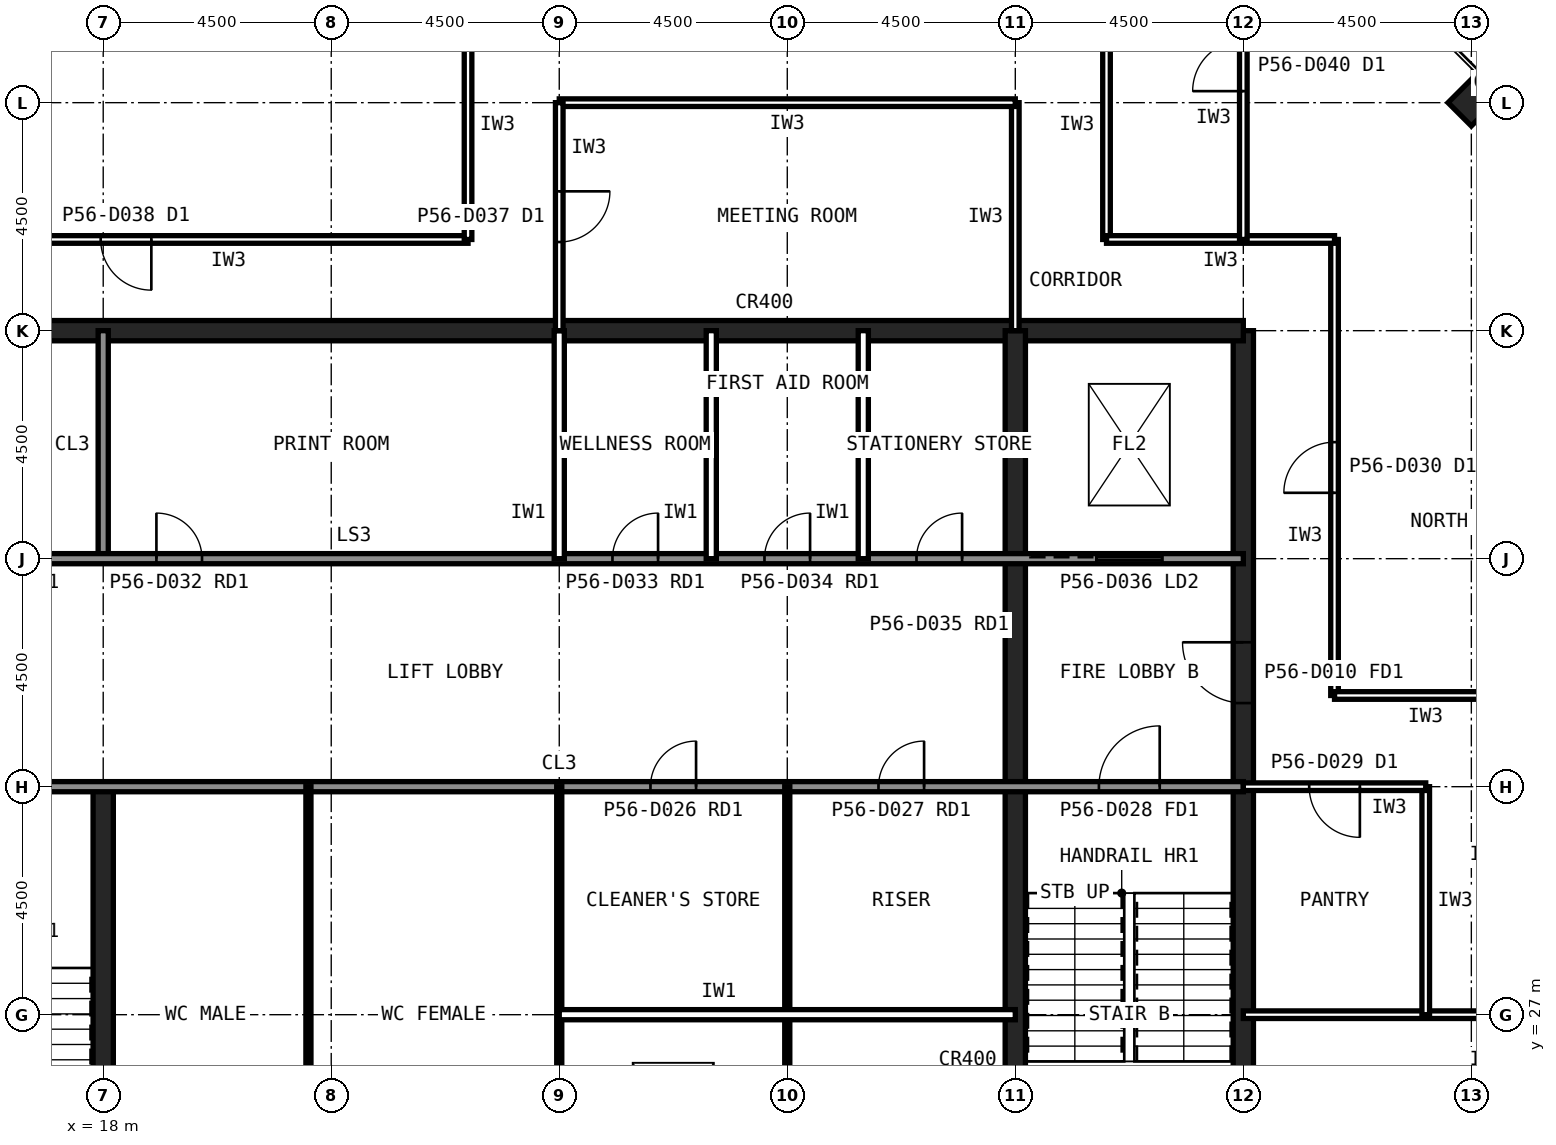
"""IFC4 building model, lengths in metres.
Left out: names, types, materials, properties, quantities, classifications, styles, units other than length and angle.
Written with IfcOpenShell. Run it as: python <this file> out.ifc"""

import sys

from ifc_helpers import new_model, si_unit, direction, frame, frame_2d, origin, origin_2d, place, context, subcontext, project, spatial, rectangle, hollow_rectangle, extrude, element, fill, save


model = new_model("IFC4")
c1 = context("Model", 3, precision=1e-05, world=origin(), true_north=direction((0.0, 1.0)))
c2 = subcontext(c1, "Body", "Model", "MODEL_VIEW")
j1 = project(units=[si_unit("LENGTHUNIT", "METRE"), si_unit("PLANEANGLEUNIT", "RADIAN")], contexts=[c1])
p1 = place(None, origin())
s1 = spatial("IfcSite", under=j1, at=p1, CompositionType="ELEMENT")
p2 = place(p1, origin())
s2 = spatial("IfcBuilding", under=s1, at=p2, CompositionType="ELEMENT")
p3 = place(p2, frame((0.0, 0.0, 238.6)))
s3 = spatial("IfcBuildingStorey", under=s2, at=p3, CompositionType="ELEMENT", Elevation=238.6)
p4 = place(p3, frame((45.0, 45.0, 0.0), z_axis=(0.0, 0.0, 1.0), x_axis=(0.707106781187, 0.707106781187, 0.0)))
e1 = element("IfcColumn", 1, at=p4, inside=s3, PredefinedType="COLUMN", context=c2, shape_type="SweptSolid", body=[
    extrude(hollow_rectangle(XDim=0.65, YDim=0.65, WallThickness=0.032, at=origin_2d()), origin(), (0.0, 0.0, 1.0), 4.0),
])
p5 = place(p3, frame((40.5, 13.5, 0.0), z_axis=(0.0, 0.0, 1.0), x_axis=(0.0, 1.0, 0.0)))
e2 = element("IfcWall", 2, at=p5, inside=s3, PredefinedType="SHEAR", context=c2, shape_type="SweptSolid", body=[
    extrude(rectangle(XDim=27.0, YDim=0.4, at=frame_2d((13.5, 0.0))), origin(), (0.0, 0.0, 1.0), 4.0),
])
p6 = place(p5, frame((5.85, 0.0, 0.0)))
e3 = element("IfcOpeningElement", 3, at=p6, cuts=e2, PredefinedType="OPENING", context=c2, shape_type="SweptSolid", body=[
    extrude(rectangle(XDim=1.8, YDim=2.1, at=frame_2d((0.9, 1.05))), frame((0.0, 0.21, 0.0), z_axis=(0.0, -1.0, 0.0), x_axis=(1.0, 0.0, 0.0)), (0.0, 0.0, 1.0), 0.42),
])
p7 = place(p5, frame((19.65, 0.0, 0.0)))
e4 = element("IfcOpeningElement", 4, at=p7, cuts=e2, PredefinedType="OPENING", context=c2, shape_type="SweptSolid", body=[
    extrude(rectangle(XDim=1.2, YDim=2.1, at=frame_2d((0.6, 1.05))), frame((0.0, 0.21, 0.0), z_axis=(0.0, -1.0, 0.0), x_axis=(1.0, 0.0, 0.0)), (0.0, 0.0, 1.0), 0.42),
])
p8 = place(p3, frame((40.5, 40.5, 0.0), z_axis=(0.0, 0.0, 1.0), x_axis=(-1.0, 0.0, 0.0)))
e5 = element("IfcWall", 5, at=p8, inside=s3, PredefinedType="SHEAR", context=c2, shape_type="SweptSolid", body=[
    extrude(rectangle(XDim=27.0, YDim=0.4, at=frame_2d((13.5, 0.0))), origin(), (0.0, 0.0, 1.0), 4.0),
])
p9 = place(p3, frame((18.0, 13.5, 0.0), z_axis=(0.0, 0.0, 1.0), x_axis=(0.0, 1.0, 0.0)))
e6 = element("IfcWall", 6, at=p9, inside=s3, PredefinedType="SHEAR", context=c2, shape_type="SweptSolid", body=[
    extrude(rectangle(XDim=18.0, YDim=0.4, at=frame_2d((9.0, 0.0))), origin(), (0.0, 0.0, 1.0), 4.0),
])
p10 = place(p3, frame((18.0, 36.0, 0.0), z_axis=(0.0, 0.0, 1.0), x_axis=(0.0, 1.0, 0.0)))
e7 = element("IfcWall", 7, at=p10, inside=s3, PredefinedType="SOLIDWALL", context=c2, shape_type="SweptSolid", body=[
    extrude(rectangle(XDim=4.5, YDim=0.2, at=frame_2d((2.25, 0.0))), origin(), (0.0, 0.0, 1.0), 3.84),
])
p11 = place(p3, frame((36.0, 22.5, 0.0), z_axis=(0.0, 0.0, 1.0), x_axis=(0.0, 1.0, 0.0)))
e8 = element("IfcWall", 8, at=p11, inside=s3, PredefinedType="SHEAR", context=c2, shape_type="SweptSolid", body=[
    extrude(rectangle(XDim=18.0, YDim=0.4, at=frame_2d((9.0, 0.0))), origin(), (0.0, 0.0, 1.0), 4.0),
])
p12 = place(p3, frame((13.5, 36.0, 0.0), z_axis=(0.0, 0.0, 1.0), x_axis=(1.0, 0.0, 0.0)))
e9 = element("IfcWall", 9, at=p12, inside=s3, PredefinedType="SOLIDWALL", context=c2, shape_type="SweptSolid", body=[
    extrude(rectangle(XDim=27.0, YDim=0.2, at=frame_2d((13.5, 0.0))), origin(), (0.0, 0.0, 1.0), 3.84),
])
p13 = place(p12, frame((1.8, 0.0, 0.0)))
e10 = element("IfcOpeningElement", 10, at=p13, cuts=e9, PredefinedType="OPENING", context=c2, shape_type="SweptSolid", body=[
    extrude(rectangle(XDim=0.9, YDim=2.1, at=frame_2d((0.45, 1.05))), frame((0.0, 0.11, 0.0), z_axis=(0.0, -1.0, 0.0), x_axis=(1.0, 0.0, 0.0)), (0.0, 0.0, 1.0), 0.22),
])
p14 = place(p12, frame((5.55, 0.0, 0.0)))
e11 = element("IfcOpeningElement", 11, at=p14, cuts=e9, PredefinedType="OPENING", context=c2, shape_type="SweptSolid", body=[
    extrude(rectangle(XDim=0.9, YDim=2.1, at=frame_2d((0.45, 1.05))), frame((0.0, 0.11, 0.0), z_axis=(0.0, -1.0, 0.0), x_axis=(1.0, 0.0, 0.0)), (0.0, 0.0, 1.0), 0.22),
])
p15 = place(p12, frame((14.55, 0.0, 0.0)))
e12 = element("IfcOpeningElement", 12, at=p15, cuts=e9, PredefinedType="OPENING", context=c2, shape_type="SweptSolid", body=[
    extrude(rectangle(XDim=0.9, YDim=2.1, at=frame_2d((0.45, 1.05))), frame((0.0, 0.11, 0.0), z_axis=(0.0, -1.0, 0.0), x_axis=(1.0, 0.0, 0.0)), (0.0, 0.0, 1.0), 0.22),
])
p16 = place(p12, frame((17.55, 0.0, 0.0)))
e13 = element("IfcOpeningElement", 13, at=p16, cuts=e9, PredefinedType="OPENING", context=c2, shape_type="SweptSolid", body=[
    extrude(rectangle(XDim=0.9, YDim=2.1, at=frame_2d((0.45, 1.05))), frame((0.0, 0.11, 0.0), z_axis=(0.0, -1.0, 0.0), x_axis=(1.0, 0.0, 0.0)), (0.0, 0.0, 1.0), 0.22),
])
p17 = place(p12, frame((20.55, 0.0, 0.0)))
e14 = element("IfcOpeningElement", 14, at=p17, cuts=e9, PredefinedType="OPENING", context=c2, shape_type="SweptSolid", body=[
    extrude(rectangle(XDim=0.9, YDim=2.1, at=frame_2d((0.45, 1.05))), frame((0.0, 0.11, 0.0), z_axis=(0.0, -1.0, 0.0), x_axis=(1.0, 0.0, 0.0)), (0.0, 0.0, 1.0), 0.22),
])
p18 = place(p12, frame((24.1, 0.0, 0.0)))
e15 = element("IfcOpeningElement", 15, at=p18, cuts=e9, PredefinedType="OPENING", context=c2, shape_type="SweptSolid", body=[
    extrude(rectangle(XDim=1.3, YDim=2.2, at=frame_2d((0.65, 1.1))), frame((0.0, 0.11, 0.0), z_axis=(0.0, -1.0, 0.0), x_axis=(1.0, 0.0, 0.0)), (0.0, 0.0, 1.0), 0.22),
])
p19 = place(p3, frame((13.5, 31.5, 0.0), z_axis=(0.0, 0.0, 1.0), x_axis=(1.0, 0.0, 0.0)))
e16 = element("IfcWall", 16, at=p19, inside=s3, PredefinedType="SOLIDWALL", context=c2, shape_type="SweptSolid", body=[
    extrude(rectangle(XDim=27.0, YDim=0.2, at=frame_2d((13.5, 0.0))), origin(), (0.0, 0.0, 1.0), 3.84),
])
p20 = place(p19, frame((24.15, 0.0, 0.0)))
e17 = element("IfcOpeningElement", 17, at=p20, cuts=e16, PredefinedType="OPENING", context=c2, shape_type="SweptSolid", body=[
    extrude(rectangle(XDim=1.2, YDim=2.1, at=frame_2d((0.6, 1.05))), frame((0.0, 0.11, 0.0), z_axis=(0.0, -1.0, 0.0), x_axis=(1.0, 0.0, 0.0)), (0.0, 0.0, 1.0), 0.22),
])
p21 = place(p19, frame((15.3, 0.0, 0.0)))
e18 = element("IfcOpeningElement", 18, at=p21, cuts=e16, PredefinedType="OPENING", context=c2, shape_type="SweptSolid", body=[
    extrude(rectangle(XDim=0.9, YDim=2.1, at=frame_2d((0.45, 1.05))), frame((0.0, 0.11, 0.0), z_axis=(0.0, -1.0, 0.0), x_axis=(1.0, 0.0, 0.0)), (0.0, 0.0, 1.0), 0.22),
])
p22 = place(p19, frame((19.8, 0.0, 0.0)))
e19 = element("IfcOpeningElement", 19, at=p22, cuts=e16, PredefinedType="OPENING", context=c2, shape_type="SweptSolid", body=[
    extrude(rectangle(XDim=0.9, YDim=2.1, at=frame_2d((0.45, 1.05))), frame((0.0, 0.11, 0.0), z_axis=(0.0, -1.0, 0.0), x_axis=(1.0, 0.0, 0.0)), (0.0, 0.0, 1.0), 0.22),
])
for number, where, z_axis, x_axis in (
    (20, (27.0, 36.0, 0.0), (0.0, 0.0, 1.0), (0.0, 1.0, 0.0)),
    (21, (30.0, 36.0, 0.0), (0.0, 0.0, 1.0), (0.0, 1.0, 0.0)),
    (22, (33.0, 36.0, 0.0), (0.0, 0.0, 1.0), (0.0, 1.0, 0.0)),
):
    element("IfcWall", number, at=place(p3, frame(where, z_axis=z_axis, x_axis=x_axis)), inside=s3, PredefinedType="PARTITIONING", context=c2, shape_type="SweptSolid", body=[
        extrude(rectangle(XDim=4.5, YDim=0.2, at=frame_2d((2.25, 0.0))), origin(), (0.0, 0.0, 1.0), 3.84),
    ])
for number, where, z_axis, x_axis in (
    (23, (22.05, 22.5, 0.0), (0.0, 0.0, 1.0), (0.0, 1.0, 0.0)),
    (24, (27.0, 22.5, 0.0), (0.0, 0.0, 1.0), (0.0, 1.0, 0.0)),
    (25, (31.5, 22.5, 0.0), (0.0, 0.0, 1.0), (0.0, 1.0, 0.0)),
):
    element("IfcWall", number, at=place(p3, frame(where, z_axis=z_axis, x_axis=x_axis)), inside=s3, PredefinedType="PLUMBINGWALL", context=c2, shape_type="SweptSolid", body=[
        extrude(rectangle(XDim=9.0, YDim=0.1, at=frame_2d((4.5, 0.0))), origin(), (0.0, 0.0, 1.0), 3.84),
    ])
p23 = place(p3, frame((27.0, 27.0, 0.0), z_axis=(0.0, 0.0, 1.0), x_axis=(1.0, 0.0, 0.0)))
e26 = element("IfcWall", 26, at=p23, inside=s3, PredefinedType="PARTITIONING", context=c2, shape_type="SweptSolid", body=[
    extrude(rectangle(XDim=9.0, YDim=0.2, at=frame_2d((4.5, 0.0))), origin(), (0.0, 0.0, 1.0), 3.84),
])
p24 = place(p3, frame((40.5, 27.0, 0.0), z_axis=(0.0, 0.0, 1.0), x_axis=(1.0, 0.0, 0.0)))
e27 = element("IfcWall", 27, at=p24, inside=s3, PredefinedType="PARTITIONING", context=c2, shape_type="SweptSolid", body=[
    extrude(rectangle(XDim=13.165, YDim=0.15, at=frame_2d((6.583, 0.0))), origin(), (0.0, 0.0, 1.0), 2.989),
])
p25 = place(p3, frame((25.2, 42.3, 0.0), z_axis=(0.0, 0.0, 1.0), x_axis=(-1.0, 0.0, 0.0)))
e28 = element("IfcWall", 28, at=p25, inside=s3, PredefinedType="PARTITIONING", context=c2, shape_type="SweptSolid", body=[
    extrude(rectangle(XDim=13.5, YDim=0.15, at=frame_2d((6.75, 0.0))), origin(), (0.0, 0.0, 1.0), 3.84),
])
p26 = place(p25, frame((6.25, 0.0, 0.0)))
e29 = element("IfcOpeningElement", 29, at=p26, cuts=e28, PredefinedType="OPENING", context=c2, shape_type="SweptSolid", body=[
    extrude(rectangle(XDim=1.0, YDim=2.1, at=frame_2d((0.5, 1.05))), frame((0.0, 0.085, 0.0), z_axis=(0.0, -1.0, 0.0), x_axis=(1.0, 0.0, 0.0)), (0.0, 0.0, 1.0), 0.17),
])
p27 = place(p3, frame((42.3, 33.3, 0.0), z_axis=(0.0, 0.0, 1.0), x_axis=(0.0, 1.0, 0.0)))
e30 = element("IfcWall", 30, at=p27, inside=s3, PredefinedType="PARTITIONING", context=c2, shape_type="SweptSolid", body=[
    extrude(rectangle(XDim=9.0, YDim=0.15, at=frame_2d((4.5, 0.0))), origin(), (0.0, 0.0, 1.0), 3.84),
])
p28 = place(p27, frame((4.0, 0.0, 0.0)))
e31 = element("IfcOpeningElement", 31, at=p28, cuts=e30, PredefinedType="OPENING", context=c2, shape_type="SweptSolid", body=[
    extrude(rectangle(XDim=1.0, YDim=2.1, at=frame_2d((0.5, 1.05))), frame((0.0, 0.085, 0.0), z_axis=(0.0, -1.0, 0.0), x_axis=(1.0, 0.0, 0.0)), (0.0, 0.0, 1.0), 0.17),
])
for number, where, z_axis, x_axis in (
    (32, (25.2, 46.8, 0.0), (0.0, 0.0, 1.0), (0.0, -1.0, 0.0)),
    (33, (37.8, 42.3, 0.0), (0.0, 0.0, 1.0), (0.0, 1.0, 0.0)),
    (34, (42.3, 42.3, 0.0), (0.0, 0.0, 1.0), (-1.0, 0.0, 0.0)),
):
    element("IfcWall", number, at=place(p3, frame(where, z_axis=z_axis, x_axis=x_axis)), inside=s3, PredefinedType="PARTITIONING", context=c2, shape_type="SweptSolid", body=[
        extrude(rectangle(XDim=4.5, YDim=0.15, at=frame_2d((2.25, 0.0))), origin(), (0.0, 0.0, 1.0), 3.84),
    ])
p29 = place(p3, frame((45.9, 33.3, 0.0), z_axis=(0.0, 0.0, 1.0), x_axis=(-1.0, 0.0, 0.0)))
e35 = element("IfcWall", 35, at=p29, inside=s3, PredefinedType="PARTITIONING", context=c2, shape_type="SweptSolid", body=[
    extrude(rectangle(XDim=3.6, YDim=0.15, at=frame_2d((1.8, 0.0))), origin(), (0.0, 0.0, 1.0), 3.84),
])
p30 = place(p3, frame((36.0, 40.5, 0.0), z_axis=(0.0, 0.0, 1.0), x_axis=(0.0, 1.0, 0.0)))
e36 = element("IfcWall", 36, at=p30, inside=s3, PredefinedType="PARTITIONING", context=c2, shape_type="SweptSolid", body=[
    extrude(rectangle(XDim=4.5, YDim=0.15, at=frame_2d((2.25, 0.0))), origin(), (0.0, 0.0, 1.0), 2.989),
])
p31 = place(p3, frame((36.0, 45.0, 0.0), z_axis=(0.0, 0.0, 1.0), x_axis=(-1.0, 0.0, 0.0)))
e37 = element("IfcWall", 37, at=p31, inside=s3, PredefinedType="PARTITIONING", context=c2, shape_type="SweptSolid", body=[
    extrude(rectangle(XDim=9.0, YDim=0.15, at=frame_2d((4.5, 0.0))), origin(), (0.0, 0.0, 1.0), 3.84),
])
p32 = place(p3, frame((27.0, 45.0, 0.0), z_axis=(0.0, 0.0, 1.0), x_axis=(0.0, -1.0, 0.0)))
e38 = element("IfcWall", 38, at=p32, inside=s3, PredefinedType="PARTITIONING", context=c2, shape_type="SweptSolid", body=[
    extrude(rectangle(XDim=4.5, YDim=0.15, at=frame_2d((2.25, 0.0))), origin(), (0.0, 0.0, 1.0), 2.989),
])
p33 = place(p32, frame((1.75, 0.0, 0.0)))
e39 = element("IfcOpeningElement", 39, at=p33, cuts=e38, PredefinedType="OPENING", context=c2, shape_type="SweptSolid", body=[
    extrude(rectangle(XDim=1.0, YDim=2.1, at=frame_2d((0.5, 1.05))), frame((0.0, 0.085, 0.0), z_axis=(0.0, -1.0, 0.0), x_axis=(1.0, 0.0, 0.0)), (0.0, 0.0, 1.0), 0.17),
])
p34 = place(p3, frame((44.1, 27.0, 0.0), z_axis=(0.0, 0.0, 1.0), x_axis=(0.0, 1.0, 0.0)))
e40 = element("IfcWall", 40, at=p34, inside=s3, PredefinedType="PARTITIONING", context=c2, shape_type="SweptSolid", body=[
    extrude(rectangle(XDim=4.5, YDim=0.15, at=frame_2d((2.25, 0.0))), origin(), (0.0, 0.0, 1.0), 3.84),
])
p35 = place(p3, frame((44.1, 31.5, 0.0), z_axis=(0.0, 0.0, 1.0), x_axis=(-1.0, 0.0, 0.0)))
e41 = element("IfcWall", 41, at=p35, inside=s3, PredefinedType="PARTITIONING", context=c2, shape_type="SweptSolid", body=[
    extrude(rectangle(XDim=3.6, YDim=0.15, at=frame_2d((1.8, 0.0))), origin(), (0.0, 0.0, 1.0), 2.989),
])
p36 = place(p35, frame((1.3, 0.0, 0.0)))
e42 = element("IfcOpeningElement", 42, at=p36, cuts=e41, PredefinedType="OPENING", context=c2, shape_type="SweptSolid", body=[
    extrude(rectangle(XDim=1.0, YDim=2.1, at=frame_2d((0.5, 1.05))), frame((0.0, 0.085, 0.0), z_axis=(0.0, -1.0, 0.0), x_axis=(1.0, 0.0, 0.0)), (0.0, 0.0, 1.0), 0.17),
])
p37 = place(p3, frame((40.5, 42.3, 0.0), z_axis=(0.0, 0.0, 1.0), x_axis=(0.0, 1.0, 0.0)))
e43 = element("IfcWall", 43, at=p37, inside=s3, PredefinedType="PARTITIONING", context=c2, shape_type="SweptSolid", body=[
    extrude(rectangle(XDim=6.855, YDim=0.15, at=frame_2d((3.427, 0.0))), origin(), (0.0, 0.0, 1.0), 2.989),
])
p38 = place(p37, frame((2.927, 0.0, 0.0)))
e44 = element("IfcOpeningElement", 44, at=p38, cuts=e43, PredefinedType="OPENING", context=c2, shape_type="SweptSolid", body=[
    extrude(rectangle(XDim=1.0, YDim=2.1, at=frame_2d((0.5, 1.05))), frame((0.0, 0.085, 0.0), z_axis=(0.0, -1.0, 0.0), x_axis=(1.0, 0.0, 0.0)), (0.0, 0.0, 1.0), 0.17),
])
p39 = place(p7, origin())
e45 = element("IfcDoor", 45, at=p39, inside=s3, OperationType="SINGLE_SWING_RIGHT", PredefinedType="DOOR", context=c2, shape_type="SweptSolid", body=[
    extrude(rectangle(XDim=1.2, YDim=2.1, at=frame_2d((0.6, 1.05))), frame((0.0, 0.025, 0.0), z_axis=(0.0, -1.0, 0.0), x_axis=(1.0, 0.0, 0.0)), (0.0, 0.0, 1.0), 0.05),
])
fill(e4, e45)
p40 = place(p20, origin())
e46 = element("IfcDoor", 46, at=p40, inside=s3, OperationType="SINGLE_SWING_RIGHT", PredefinedType="DOOR", context=c2, shape_type="SweptSolid", body=[
    extrude(rectangle(XDim=1.2, YDim=2.1, at=frame_2d((0.6, 1.05))), frame((0.0, 0.025, 0.0), z_axis=(0.0, -1.0, 0.0), x_axis=(1.0, 0.0, 0.0)), (0.0, 0.0, 1.0), 0.05),
])
fill(e17, e46)
p41 = place(p21, origin())
e47 = element("IfcDoor", 47, at=p41, inside=s3, OperationType="SINGLE_SWING_RIGHT", PredefinedType="DOOR", context=c2, shape_type="SweptSolid", body=[
    extrude(rectangle(XDim=0.9, YDim=2.1, at=frame_2d((0.45, 1.05))), frame((0.0, 0.025, 0.0), z_axis=(0.0, -1.0, 0.0), x_axis=(1.0, 0.0, 0.0)), (0.0, 0.0, 1.0), 0.05),
])
fill(e18, e47)
p42 = place(p22, origin())
e48 = element("IfcDoor", 48, at=p42, inside=s3, OperationType="SINGLE_SWING_RIGHT", PredefinedType="DOOR", context=c2, shape_type="SweptSolid", body=[
    extrude(rectangle(XDim=0.9, YDim=2.1, at=frame_2d((0.45, 1.05))), frame((0.0, 0.025, 0.0), z_axis=(0.0, -1.0, 0.0), x_axis=(1.0, 0.0, 0.0)), (0.0, 0.0, 1.0), 0.05),
])
fill(e19, e48)
p43 = place(p14, origin())
e49 = element("IfcDoor", 49, at=p43, inside=s3, OperationType="SINGLE_SWING_LEFT", PredefinedType="DOOR", context=c2, shape_type="SweptSolid", body=[
    extrude(rectangle(XDim=0.9, YDim=2.1, at=frame_2d((0.45, 1.05))), frame((0.0, 0.025, 0.0), z_axis=(0.0, -1.0, 0.0), x_axis=(1.0, 0.0, 0.0)), (0.0, 0.0, 1.0), 0.05),
])
fill(e11, e49)
p44 = place(p15, origin())
e50 = element("IfcDoor", 50, at=p44, inside=s3, OperationType="SINGLE_SWING_RIGHT", PredefinedType="DOOR", context=c2, shape_type="SweptSolid", body=[
    extrude(rectangle(XDim=0.9, YDim=2.1, at=frame_2d((0.45, 1.05))), frame((0.0, 0.025, 0.0), z_axis=(0.0, -1.0, 0.0), x_axis=(1.0, 0.0, 0.0)), (0.0, 0.0, 1.0), 0.05),
])
fill(e12, e50)
p45 = place(p16, origin())
e51 = element("IfcDoor", 51, at=p45, inside=s3, OperationType="SINGLE_SWING_RIGHT", PredefinedType="DOOR", context=c2, shape_type="SweptSolid", body=[
    extrude(rectangle(XDim=0.9, YDim=2.1, at=frame_2d((0.45, 1.05))), frame((0.0, 0.025, 0.0), z_axis=(0.0, -1.0, 0.0), x_axis=(1.0, 0.0, 0.0)), (0.0, 0.0, 1.0), 0.05),
])
fill(e13, e51)
p46 = place(p17, origin())
e52 = element("IfcDoor", 52, at=p46, inside=s3, OperationType="SINGLE_SWING_RIGHT", PredefinedType="DOOR", context=c2, shape_type="SweptSolid", body=[
    extrude(rectangle(XDim=0.9, YDim=2.1, at=frame_2d((0.45, 1.05))), frame((0.0, 0.025, 0.0), z_axis=(0.0, -1.0, 0.0), x_axis=(1.0, 0.0, 0.0)), (0.0, 0.0, 1.0), 0.05),
])
fill(e14, e52)
p47 = place(p18, origin())
e53 = element("IfcDoor", 53, at=p47, inside=s3, OperationType="SLIDING_TO_LEFT", PredefinedType="DOOR", context=c2, shape_type="SweptSolid", body=[
    extrude(rectangle(XDim=1.3, YDim=2.2, at=frame_2d((0.65, 1.1))), frame((0.0, 0.025, 0.0), z_axis=(0.0, -1.0, 0.0), x_axis=(1.0, 0.0, 0.0)), (0.0, 0.0, 1.0), 0.05),
])
fill(e15, e53)
p48 = place(p26, origin())
e54 = element("IfcDoor", 54, at=p48, inside=s3, OperationType="SINGLE_SWING_LEFT", PredefinedType="DOOR", context=c2, shape_type="SweptSolid", body=[
    extrude(rectangle(XDim=1.0, YDim=2.1, at=frame_2d((0.5, 1.05))), frame((0.0, 0.025, 0.0), z_axis=(0.0, -1.0, 0.0), x_axis=(1.0, 0.0, 0.0)), (0.0, 0.0, 1.0), 0.05),
])
fill(e29, e54)
p49 = place(p28, origin())
e55 = element("IfcDoor", 55, at=p49, inside=s3, OperationType="SINGLE_SWING_LEFT", PredefinedType="DOOR", context=c2, shape_type="SweptSolid", body=[
    extrude(rectangle(XDim=1.0, YDim=2.1, at=frame_2d((0.5, 1.05))), frame((0.0, 0.025, 0.0), z_axis=(0.0, -1.0, 0.0), x_axis=(1.0, 0.0, 0.0)), (0.0, 0.0, 1.0), 0.05),
])
fill(e31, e55)
p50 = place(p33, origin())
e56 = element("IfcDoor", 56, at=p50, inside=s3, OperationType="SINGLE_SWING_LEFT", PredefinedType="DOOR", context=c2, shape_type="SweptSolid", body=[
    extrude(rectangle(XDim=1.0, YDim=2.1, at=frame_2d((0.5, 1.05))), frame((0.0, 0.025, 0.0), z_axis=(0.0, -1.0, 0.0), x_axis=(1.0, 0.0, 0.0)), (0.0, 0.0, 1.0), 0.05),
])
fill(e39, e56)
p51 = place(p36, origin())
e57 = element("IfcDoor", 57, at=p51, inside=s3, OperationType="SINGLE_SWING_LEFT", PredefinedType="DOOR", context=c2, shape_type="SweptSolid", body=[
    extrude(rectangle(XDim=1.0, YDim=2.1, at=frame_2d((0.5, 1.05))), frame((0.0, 0.025, 0.0), z_axis=(0.0, -1.0, 0.0), x_axis=(1.0, 0.0, 0.0)), (0.0, 0.0, 1.0), 0.05),
])
fill(e42, e57)
p52 = place(p38, origin())
e58 = element("IfcDoor", 58, at=p52, inside=s3, OperationType="SINGLE_SWING_LEFT", PredefinedType="DOOR", context=c2, shape_type="SweptSolid", body=[
    extrude(rectangle(XDim=1.0, YDim=2.1, at=frame_2d((0.5, 1.05))), frame((0.0, 0.025, 0.0), z_axis=(0.0, -1.0, 0.0), x_axis=(1.0, 0.0, 0.0)), (0.0, 0.0, 1.0), 0.05),
])
fill(e44, e58)
save(model, sys.argv[1])
